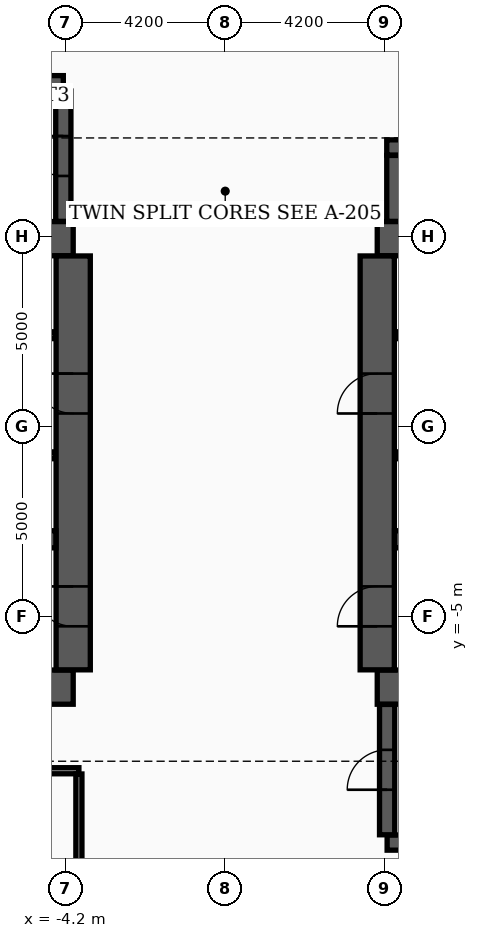
"""IFC4 building model, lengths in metres.
Left out: names, types, materials, properties, quantities, classifications, styles, units other than length and angle.
Written with IfcOpenShell. Run it as: python <this file> out.ifc"""

import sys

from ifc_helpers import new_model, si_unit, direction, frame, frame_2d, origin, place, context, subcontext, project, spatial, rectangle, extrude, element, fill, save


model = new_model("IFC4")
c1 = context("Model", 3, precision=1e-05, world=origin(), true_north=direction((0.0, 1.0)))
c2 = subcontext(c1, "Body", "Model", "MODEL_VIEW")
j1 = project(units=[si_unit("LENGTHUNIT", "METRE"), si_unit("PLANEANGLEUNIT", "RADIAN")], contexts=[c1])
p1 = place(None, origin())
s1 = spatial("IfcSite", under=j1, at=p1, CompositionType="ELEMENT")
p2 = place(p1, origin())
s2 = spatial("IfcBuilding", under=s1, at=p2, CompositionType="ELEMENT")
p3 = place(p2, frame((0.0, 0.0, 75.6)))
s3 = spatial("IfcBuildingStorey", under=s2, at=p3, CompositionType="ELEMENT", Elevation=75.6)
for number, where, z_axis, x_axis in (
    (1, (-12.4, -6.85, 0.0), (0.0, 0.0, 1.0), (1.0, 0.0, 0.0)),
    (2, (-12.4, 4.95, 0.0), (0.0, 0.0, 1.0), (1.0, 0.0, 0.0)),
):
    element("IfcWall", number, at=place(p3, frame(where, z_axis=z_axis, x_axis=x_axis)), inside=s3, PredefinedType="SHEAR", context=c2, shape_type="SweptSolid", body=[
        extrude(rectangle(XDim=8.4, YDim=0.9, at=frame_2d((4.2, 0.0))), origin(), (0.0, 0.0, 1.0), 3.7),
    ])
p4 = place(p3, frame((-4.0, -6.395, 0.0), z_axis=(0.0, 0.0, 1.0), x_axis=(0.0, 1.0, 0.0)))
e3 = element("IfcWall", 3, at=p4, inside=s3, PredefinedType="SHEAR", context=c2, shape_type="SweptSolid", body=[
    extrude(rectangle(XDim=10.89, YDim=0.9, at=frame_2d((5.445, 0.0))), origin(), (0.0, 0.0, 1.0), 3.7),
])
p5 = place(p4, frame((1.145, 0.0, 0.0)))
e4 = element("IfcOpeningElement", 4, at=p5, cuts=e3, PredefinedType="OPENING", context=c2, shape_type="SweptSolid", body=[
    extrude(rectangle(XDim=1.05, YDim=2.15, at=frame_2d((0.525, 1.075))), frame((0.0, 0.46, 0.0), z_axis=(0.0, -1.0, 0.0), x_axis=(1.0, 0.0, 0.0)), (0.0, 0.0, 1.0), 0.92),
])
p6 = place(p4, frame((6.745, 0.0, 0.0)))
e5 = element("IfcOpeningElement", 5, at=p6, cuts=e3, PredefinedType="OPENING", context=c2, shape_type="SweptSolid", body=[
    extrude(rectangle(XDim=1.05, YDim=2.15, at=frame_2d((0.525, 1.075))), frame((0.0, 0.46, 0.0), z_axis=(0.0, -1.0, 0.0), x_axis=(1.0, 0.0, 0.0)), (0.0, 0.0, 1.0), 0.92),
])
p7 = place(p3, frame((-11.945, -2.96, 0.0), z_axis=(0.0, 0.0, 1.0), x_axis=(1.0, 0.0, 0.0)))
e6 = element("IfcWall", 6, at=p7, inside=s3, PredefinedType="SHEAR", context=c2, shape_type="SweptSolid", body=[
    extrude(rectangle(XDim=7.49, YDim=0.45, at=frame_2d((3.745, 0.0))), origin(), (0.0, 0.0, 1.0), 3.7),
])
for number, where, z_axis, x_axis in (
    (7, (4.0, -6.85, 0.0), (0.0, 0.0, 1.0), (1.0, 0.0, 0.0)),
    (8, (4.0, 4.95, 0.0), (0.0, 0.0, 1.0), (1.0, 0.0, 0.0)),
):
    element("IfcWall", number, at=place(p3, frame(where, z_axis=z_axis, x_axis=x_axis)), inside=s3, PredefinedType="SHEAR", context=c2, shape_type="SweptSolid", body=[
        extrude(rectangle(XDim=8.4, YDim=0.9, at=frame_2d((4.2, 0.0))), origin(), (0.0, 0.0, 1.0), 3.7),
    ])
p8 = place(p3, frame((4.0, -6.395, 0.0), z_axis=(0.0, 0.0, 1.0), x_axis=(0.0, 1.0, 0.0)))
e9 = element("IfcWall", 9, at=p8, inside=s3, PredefinedType="SHEAR", context=c2, shape_type="SweptSolid", body=[
    extrude(rectangle(XDim=10.89, YDim=0.9, at=frame_2d((5.445, 0.0))), origin(), (0.0, 0.0, 1.0), 3.7),
])
p9 = place(p8, frame((1.145, 0.0, 0.0)))
e10 = element("IfcOpeningElement", 10, at=p9, cuts=e9, PredefinedType="OPENING", context=c2, shape_type="SweptSolid", body=[
    extrude(rectangle(XDim=1.05, YDim=2.15, at=frame_2d((0.525, 1.075))), frame((0.0, 0.46, 0.0), z_axis=(0.0, -1.0, 0.0), x_axis=(1.0, 0.0, 0.0)), (0.0, 0.0, 1.0), 0.92),
])
p10 = place(p8, frame((6.745, 0.0, 0.0)))
e11 = element("IfcOpeningElement", 11, at=p10, cuts=e9, PredefinedType="OPENING", context=c2, shape_type="SweptSolid", body=[
    extrude(rectangle(XDim=1.05, YDim=2.15, at=frame_2d((0.525, 1.075))), frame((0.0, 0.46, 0.0), z_axis=(0.0, -1.0, 0.0), x_axis=(1.0, 0.0, 0.0)), (0.0, 0.0, 1.0), 0.92),
])
p11 = place(p3, frame((4.455, -2.96, 0.0), z_axis=(0.0, 0.0, 1.0), x_axis=(1.0, 0.0, 0.0)))
e12 = element("IfcWall", 12, at=p11, inside=s3, PredefinedType="SHEAR", context=c2, shape_type="SweptSolid", body=[
    extrude(rectangle(XDim=7.49, YDim=0.45, at=frame_2d((3.745, 0.0))), origin(), (0.0, 0.0, 1.0), 3.7),
])
p12 = place(p3, frame((-12.22, 9.04, 0.0), z_axis=(0.0, 0.0, 1.0), x_axis=(1.0, 0.0, 0.0)))
e13 = element("IfcWall", 13, at=p12, inside=s3, PredefinedType="SHEAR", context=c2, shape_type="SweptSolid", body=[
    extrude(rectangle(XDim=7.96, YDim=0.4, at=frame_2d((3.98, 0.0))), origin(), (0.0, 0.0, 1.0), 3.7),
])
p13 = place(p3, frame((-4.26, 5.405, 0.0), z_axis=(0.0, 0.0, 1.0), x_axis=(0.0, 1.0, 0.0)))
e14 = element("IfcWall", 14, at=p13, inside=s3, PredefinedType="SHEAR", context=c2, shape_type="SweptSolid", body=[
    extrude(rectangle(XDim=3.43, YDim=0.4, at=frame_2d((1.715, 0.0))), origin(), (0.0, 0.0, 1.0), 3.7),
])
p14 = place(p13, frame((1.195, 0.0, 0.0)))
e15 = element("IfcOpeningElement", 15, at=p14, cuts=e14, PredefinedType="OPENING", context=c2, shape_type="SweptSolid", body=[
    extrude(rectangle(XDim=1.05, YDim=2.15, at=frame_2d((0.525, 1.075))), frame((0.0, 0.21, 0.0), z_axis=(0.0, -1.0, 0.0), x_axis=(1.0, 0.0, 0.0)), (0.0, 0.0, 1.0), 0.42),
])
p15 = place(p3, frame((4.26, -10.94, 0.0), z_axis=(0.0, 0.0, 1.0), x_axis=(1.0, 0.0, 0.0)))
e16 = element("IfcWall", 16, at=p15, inside=s3, PredefinedType="SHEAR", context=c2, shape_type="SweptSolid", body=[
    extrude(rectangle(XDim=7.96, YDim=0.4, at=frame_2d((3.98, 0.0))), origin(), (0.0, 0.0, 1.0), 3.7),
])
p16 = place(p3, frame((4.26, -10.735, 0.0), z_axis=(0.0, 0.0, 1.0), x_axis=(0.0, 1.0, 0.0)))
e17 = element("IfcWall", 17, at=p16, inside=s3, PredefinedType="SHEAR", context=c2, shape_type="SweptSolid", body=[
    extrude(rectangle(XDim=3.43, YDim=0.4, at=frame_2d((1.715, 0.0))), origin(), (0.0, 0.0, 1.0), 3.7),
])
p17 = place(p16, frame((1.185, 0.0, 0.0)))
e18 = element("IfcOpeningElement", 18, at=p17, cuts=e17, PredefinedType="OPENING", context=c2, shape_type="SweptSolid", body=[
    extrude(rectangle(XDim=1.05, YDim=2.15, at=frame_2d((0.525, 1.075))), frame((0.0, 0.21, 0.0), z_axis=(0.0, -1.0, 0.0), x_axis=(1.0, 0.0, 0.0)), (0.0, 0.0, 1.0), 0.42),
])
p18 = place(p3, frame((4.45, 5.405, 0.0), z_axis=(0.0, 0.0, 1.0), x_axis=(0.0, 1.0, 0.0)))
e19 = element("IfcWall", 19, at=p18, inside=s3, PredefinedType="SHEAR", context=c2, shape_type="SweptSolid", body=[
    extrude(rectangle(XDim=1.735, YDim=0.4, at=frame_2d((0.867, 0.0))), origin(), (0.0, 0.0, 1.0), 3.7),
])
p19 = place(p3, frame((4.25, 7.35, 0.0), z_axis=(0.0, 0.0, 1.0), x_axis=(1.0, 0.0, 0.0)))
e20 = element("IfcWall", 20, at=p19, inside=s3, PredefinedType="SHEAR", context=c2, shape_type="SweptSolid", body=[
    extrude(rectangle(XDim=5.4, YDim=0.4, at=frame_2d((2.7, 0.0))), origin(), (0.0, 0.0, 1.0), 3.7),
])
p20 = place(p3, frame((-11.9, 2.41, 0.0), z_axis=(0.0, 0.0, 1.0), x_axis=(1.0, 0.0, 0.0)))
e21 = element("IfcWall", 21, at=p20, inside=s3, PredefinedType="SOLIDWALL", context=c2, shape_type="SweptSolid", body=[
    extrude(rectangle(XDim=7.42, YDim=0.18, at=frame_2d((3.71, 0.0))), origin(), (0.0, 0.0, 1.0), 2.9),
])
p21 = place(p20, frame((0.55, 0.0, 0.0)))
e22 = element("IfcOpeningElement", 22, at=p21, cuts=e21, PredefinedType="OPENING", context=c2, shape_type="SweptSolid", body=[
    extrude(rectangle(XDim=1.1, YDim=2.15, at=frame_2d((0.55, 1.075))), frame((0.0, 0.1, 0.0), z_axis=(0.0, -1.0, 0.0), x_axis=(1.0, 0.0, 0.0)), (0.0, 0.0, 1.0), 0.2),
])
p22 = place(p20, frame((3.85, 0.0, 0.0)))
e23 = element("IfcOpeningElement", 23, at=p22, cuts=e21, PredefinedType="OPENING", context=c2, shape_type="SweptSolid", body=[
    extrude(rectangle(XDim=1.1, YDim=2.15, at=frame_2d((0.55, 1.075))), frame((0.0, 0.1, 0.0), z_axis=(0.0, -1.0, 0.0), x_axis=(1.0, 0.0, 0.0)), (0.0, 0.0, 1.0), 0.2),
])
p23 = place(p20, frame((5.75, 0.0, 0.0)))
e24 = element("IfcOpeningElement", 24, at=p23, cuts=e21, PredefinedType="OPENING", context=c2, shape_type="SweptSolid", body=[
    extrude(rectangle(XDim=1.1, YDim=2.15, at=frame_2d((0.55, 1.075))), frame((0.0, 0.1, 0.0), z_axis=(0.0, -1.0, 0.0), x_axis=(1.0, 0.0, 0.0)), (0.0, 0.0, 1.0), 0.2),
])
p24 = place(p3, frame((4.48, 2.41, 0.0), z_axis=(0.0, 0.0, 1.0), x_axis=(1.0, 0.0, 0.0)))
e25 = element("IfcWall", 25, at=p24, inside=s3, PredefinedType="SOLIDWALL", context=c2, shape_type="SweptSolid", body=[
    extrude(rectangle(XDim=7.42, YDim=0.18, at=frame_2d((3.71, 0.0))), origin(), (0.0, 0.0, 1.0), 2.9),
])
p25 = place(p24, frame((5.67, 0.0, 0.0)))
e26 = element("IfcOpeningElement", 26, at=p25, cuts=e25, PredefinedType="OPENING", context=c2, shape_type="SweptSolid", body=[
    extrude(rectangle(XDim=1.1, YDim=2.15, at=frame_2d((0.55, 1.075))), frame((0.0, 0.1, 0.0), z_axis=(0.0, -1.0, 0.0), x_axis=(1.0, 0.0, 0.0)), (0.0, 0.0, 1.0), 0.2),
])
p26 = place(p24, frame((0.52, 0.0, 0.0)))
e27 = element("IfcOpeningElement", 27, at=p26, cuts=e25, PredefinedType="OPENING", context=c2, shape_type="SweptSolid", body=[
    extrude(rectangle(XDim=1.1, YDim=2.15, at=frame_2d((0.55, 1.075))), frame((0.0, 0.1, 0.0), z_axis=(0.0, -1.0, 0.0), x_axis=(1.0, 0.0, 0.0)), (0.0, 0.0, 1.0), 0.2),
])
p27 = place(p24, frame((2.42, 0.0, 0.0)))
e28 = element("IfcOpeningElement", 28, at=p27, cuts=e25, PredefinedType="OPENING", context=c2, shape_type="SweptSolid", body=[
    extrude(rectangle(XDim=1.1, YDim=2.15, at=frame_2d((0.55, 1.075))), frame((0.0, 0.1, 0.0), z_axis=(0.0, -1.0, 0.0), x_axis=(1.0, 0.0, 0.0)), (0.0, 0.0, 1.0), 0.2),
])
for number, where, z_axis, x_axis in (
    (29, (-11.9, -0.75, 0.0), (0.0, 0.0, 1.0), (1.0, 0.0, 0.0)),
    (30, (4.48, -0.75, 0.0), (0.0, 0.0, 1.0), (1.0, 0.0, 0.0)),
):
    element("IfcWall", number, at=place(p3, frame(where, z_axis=z_axis, x_axis=x_axis)), inside=s3, PredefinedType="SOLIDWALL", context=c2, shape_type="SweptSolid", body=[
        extrude(rectangle(XDim=7.42, YDim=0.18, at=frame_2d((3.71, 0.0))), origin(), (0.0, 0.0, 1.0), 2.9),
    ])
p28 = place(p3, frame((-12.4, -9.05, 0.0), z_axis=(0.0, 0.0, 1.0), x_axis=(1.0, 0.0, 0.0)))
e31 = element("IfcWall", 31, at=p28, inside=s3, PredefinedType="PARTITIONING", context=c2, shape_type="SweptSolid", body=[
    extrude(rectangle(XDim=8.55, YDim=0.16, at=frame_2d((4.275, 0.0))), origin(), (0.0, 0.0, 1.0), 2.9),
])
p29 = place(p28, frame((3.795, 0.0, 0.0)))
e32 = element("IfcOpeningElement", 32, at=p29, cuts=e31, PredefinedType="OPENING", context=c2, shape_type="SweptSolid", body=[
    extrude(rectangle(XDim=0.96, YDim=2.15, at=frame_2d((0.48, 1.075))), frame((0.0, 0.09, 0.0), z_axis=(0.0, -1.0, 0.0), x_axis=(1.0, 0.0, 0.0)), (0.0, 0.0, 1.0), 0.18),
])
p30 = place(p3, frame((-3.85, -13.065, 0.0), z_axis=(0.0, 0.0, 1.0), x_axis=(0.0, 1.0, 0.0)))
e33 = element("IfcWall", 33, at=p30, inside=s3, PredefinedType="PARTITIONING", context=c2, shape_type="SweptSolid", body=[
    extrude(rectangle(XDim=3.93, YDim=0.16, at=frame_2d((1.965, 0.0))), origin(), (0.0, 0.0, 1.0), 2.9),
])
p31 = place(p5, origin())
e34 = element("IfcDoor", 34, at=p31, inside=s3, OperationType="SINGLE_SWING_RIGHT", PredefinedType="DOOR", context=c2, shape_type="SweptSolid", body=[
    extrude(rectangle(XDim=1.05, YDim=2.15, at=frame_2d((0.525, 1.075))), frame((0.0, 0.025, 0.0), z_axis=(0.0, -1.0, 0.0), x_axis=(1.0, 0.0, 0.0)), (0.0, 0.0, 1.0), 0.05),
])
fill(e4, e34)
p32 = place(p9, origin())
e35 = element("IfcDoor", 35, at=p32, inside=s3, OperationType="SINGLE_SWING_LEFT", PredefinedType="DOOR", context=c2, shape_type="SweptSolid", body=[
    extrude(rectangle(XDim=1.05, YDim=2.15, at=frame_2d((0.525, 1.075))), frame((0.0, 0.025, 0.0), z_axis=(0.0, -1.0, 0.0), x_axis=(1.0, 0.0, 0.0)), (0.0, 0.0, 1.0), 0.05),
])
fill(e10, e35)
p33 = place(p6, origin())
e36 = element("IfcDoor", 36, at=p33, inside=s3, OperationType="SINGLE_SWING_RIGHT", PredefinedType="DOOR", context=c2, shape_type="SweptSolid", body=[
    extrude(rectangle(XDim=1.05, YDim=2.15, at=frame_2d((0.525, 1.075))), frame((0.0, 0.025, 0.0), z_axis=(0.0, -1.0, 0.0), x_axis=(1.0, 0.0, 0.0)), (0.0, 0.0, 1.0), 0.05),
])
fill(e5, e36)
p34 = place(p10, origin())
e37 = element("IfcDoor", 37, at=p34, inside=s3, OperationType="SINGLE_SWING_LEFT", PredefinedType="DOOR", context=c2, shape_type="SweptSolid", body=[
    extrude(rectangle(XDim=1.05, YDim=2.15, at=frame_2d((0.525, 1.075))), frame((0.0, 0.025, 0.0), z_axis=(0.0, -1.0, 0.0), x_axis=(1.0, 0.0, 0.0)), (0.0, 0.0, 1.0), 0.05),
])
fill(e11, e37)
p35 = place(p14, origin())
e38 = element("IfcDoor", 38, at=p35, inside=s3, OperationType="SINGLE_SWING_RIGHT", PredefinedType="DOOR", context=c2, shape_type="SweptSolid", body=[
    extrude(rectangle(XDim=1.05, YDim=2.15, at=frame_2d((0.525, 1.075))), frame((0.0, 0.025, 0.0), z_axis=(0.0, -1.0, 0.0), x_axis=(1.0, 0.0, 0.0)), (0.0, 0.0, 1.0), 0.05),
])
fill(e15, e38)
p36 = place(p17, origin())
e39 = element("IfcDoor", 39, at=p36, inside=s3, OperationType="SINGLE_SWING_LEFT", PredefinedType="DOOR", context=c2, shape_type="SweptSolid", body=[
    extrude(rectangle(XDim=1.05, YDim=2.15, at=frame_2d((0.525, 1.075))), frame((0.0, 0.025, 0.0), z_axis=(0.0, -1.0, 0.0), x_axis=(1.0, 0.0, 0.0)), (0.0, 0.0, 1.0), 0.05),
])
fill(e18, e39)
save(model, sys.argv[1])
